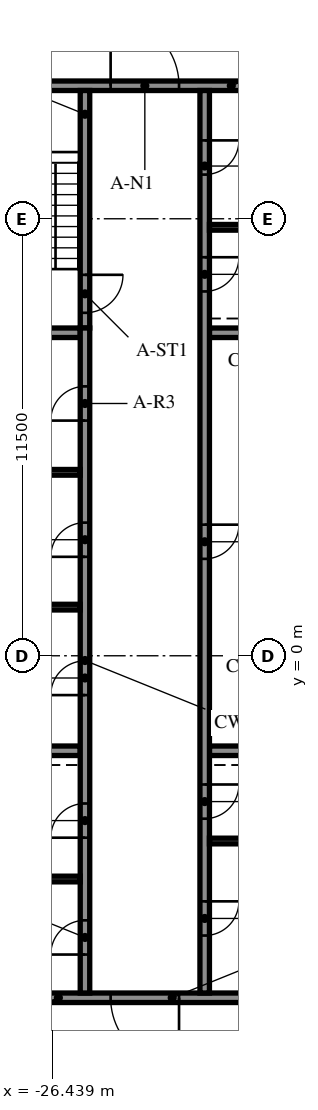
"""IFC4 building model, lengths in metres.
Left out: names, types, materials, properties, quantities, classifications, styles, units other than length and angle.
Written with IfcOpenShell. Run it as: python <this file> out.ifc"""

import sys

from ifc_helpers import new_model, si_unit, direction, frame, frame_2d, origin, place, context, subcontext, project, spatial, rectangle, extrude, element, fill, save


model = new_model("IFC4")
c1 = context("Model", 3, precision=1e-05, world=origin(), true_north=direction((0.0, 1.0)))
c2 = subcontext(c1, "Body", "Model", "MODEL_VIEW")
j1 = project(units=[si_unit("LENGTHUNIT", "METRE"), si_unit("PLANEANGLEUNIT", "RADIAN")], contexts=[c1])
p1 = place(None, origin())
s1 = spatial("IfcSite", under=j1, at=p1, CompositionType="ELEMENT")
p2 = place(p1, origin())
s2 = spatial("IfcBuilding", under=s1, at=p2, CompositionType="ELEMENT")
p3 = place(p2, frame((0.0, 0.0, 193.9)))
s3 = spatial("IfcBuildingStorey", under=s2, at=p3, CompositionType="ELEMENT", Elevation=193.9)
p4 = place(p3, frame((-19.45, -9.0, 0.0), z_axis=(0.0, 0.0, 1.0), x_axis=(-1.0, 0.0, 0.0)))
e1 = element("IfcWall", 1, at=p4, inside=s3, PredefinedType="SOLIDWALL", context=c2, shape_type="SweptSolid", body=[
    extrude(rectangle(XDim=9.1, YDim=0.25, at=frame_2d((4.55, 0.0))), origin(), (0.0, 0.0, 1.0), 3.46),
])
p5 = place(p4, frame((3.65, 0.0, 0.0)))
e2 = element("IfcOpeningElement", 2, at=p5, cuts=e1, PredefinedType="OPENING", context=c2, shape_type="SweptSolid", body=[
    extrude(rectangle(XDim=1.8, YDim=2.1, at=frame_2d((0.9, 1.05))), frame((0.0, 0.135, 0.0), z_axis=(0.0, -1.0, 0.0), x_axis=(1.0, 0.0, 0.0)), (0.0, 0.0, 1.0), 0.27),
])
p6 = place(p3, frame((-28.55, 15.0, 0.0), z_axis=(0.0, 0.0, 1.0), x_axis=(1.0, 0.0, 0.0)))
e3 = element("IfcWall", 3, at=p6, inside=s3, PredefinedType="SOLIDWALL", context=c2, shape_type="SweptSolid", body=[
    extrude(rectangle(XDim=9.1, YDim=0.25, at=frame_2d((4.55, 0.0))), origin(), (0.0, 0.0, 1.0), 3.46),
])
p7 = place(p6, frame((3.65, 0.0, 0.0)))
e4 = element("IfcOpeningElement", 4, at=p7, cuts=e3, PredefinedType="OPENING", context=c2, shape_type="SweptSolid", body=[
    extrude(rectangle(XDim=1.8, YDim=2.1, at=frame_2d((0.9, 1.05))), frame((0.0, 0.135, 0.0), z_axis=(0.0, -1.0, 0.0), x_axis=(1.0, 0.0, 0.0)), (0.0, 0.0, 1.0), 0.27),
])
p8 = place(p3, frame((-25.575, -8.875, 0.0), z_axis=(0.0, 0.0, 1.0), x_axis=(0.0, 1.0, 0.0)))
e5 = element("IfcWall", 5, at=p8, inside=s3, PredefinedType="SOLIDWALL", context=c2, shape_type="SweptSolid", body=[
    extrude(rectangle(XDim=17.5, YDim=0.25, at=frame_2d((8.75, 0.0))), origin(), (0.0, 0.0, 1.0), 3.46),
])
p9 = place(p8, frame((7.84, 0.0, 0.0)))
e6 = element("IfcOpeningElement", 6, at=p9, cuts=e5, PredefinedType="OPENING", context=c2, shape_type="SweptSolid", body=[
    extrude(rectangle(XDim=0.9, YDim=2.1, at=frame_2d((0.45, 1.05))), frame((0.0, 0.135, 0.0), z_axis=(0.0, -1.0, 0.0), x_axis=(1.0, 0.0, 0.0)), (0.0, 0.0, 1.0), 0.27),
])
p10 = place(p8, frame((11.479, 0.0, 0.0)))
e7 = element("IfcOpeningElement", 7, at=p10, cuts=e5, PredefinedType="OPENING", context=c2, shape_type="SweptSolid", body=[
    extrude(rectangle(XDim=0.9, YDim=2.1, at=frame_2d((0.45, 1.05))), frame((0.0, 0.135, 0.0), z_axis=(0.0, -1.0, 0.0), x_axis=(1.0, 0.0, 0.0)), (0.0, 0.0, 1.0), 0.27),
])
p11 = place(p8, frame((15.064, 0.0, 0.0)))
e8 = element("IfcOpeningElement", 8, at=p11, cuts=e5, PredefinedType="OPENING", context=c2, shape_type="SweptSolid", body=[
    extrude(rectangle(XDim=0.9, YDim=2.1, at=frame_2d((0.45, 1.05))), frame((0.0, 0.135, 0.0), z_axis=(0.0, -1.0, 0.0), x_axis=(1.0, 0.0, 0.0)), (0.0, 0.0, 1.0), 0.27),
])
p12 = place(p8, frame((1.012, 0.0, 0.0)))
e9 = element("IfcOpeningElement", 9, at=p12, cuts=e5, PredefinedType="OPENING", context=c2, shape_type="SweptSolid", body=[
    extrude(rectangle(XDim=0.9, YDim=2.1, at=frame_2d((0.45, 1.05))), frame((0.0, 0.135, 0.0), z_axis=(0.0, -1.0, 0.0), x_axis=(1.0, 0.0, 0.0)), (0.0, 0.0, 1.0), 0.27),
])
p13 = place(p8, frame((4.087, 0.0, 0.0)))
e10 = element("IfcOpeningElement", 10, at=p13, cuts=e5, PredefinedType="OPENING", context=c2, shape_type="SweptSolid", body=[
    extrude(rectangle(XDim=0.9, YDim=2.1, at=frame_2d((0.45, 1.05))), frame((0.0, 0.135, 0.0), z_axis=(0.0, -1.0, 0.0), x_axis=(1.0, 0.0, 0.0)), (0.0, 0.0, 1.0), 0.27),
])
p14 = place(p3, frame((-25.575, 14.875, 0.0), z_axis=(0.0, 0.0, 1.0), x_axis=(0.0, -1.0, 0.0)))
e11 = element("IfcWall", 11, at=p14, inside=s3, PredefinedType="SOLIDWALL", context=c2, shape_type="SweptSolid", body=[
    extrude(rectangle(XDim=6.25, YDim=0.25, at=frame_2d((3.125, 0.0))), origin(), (0.0, 0.0, 1.0), 3.46),
])
p15 = place(p14, frame((4.85, 0.0, 0.0)))
e12 = element("IfcOpeningElement", 12, at=p15, cuts=e11, PredefinedType="OPENING", context=c2, shape_type="SweptSolid", body=[
    extrude(rectangle(XDim=1.0, YDim=2.1, at=frame_2d((0.5, 1.05))), frame((0.0, 0.135, 0.0), z_axis=(0.0, -1.0, 0.0), x_axis=(1.0, 0.0, 0.0)), (0.0, 0.0, 1.0), 0.27),
])
p16 = place(p3, frame((-22.425, 14.875, 0.0), z_axis=(0.0, 0.0, 1.0), x_axis=(0.0, -1.0, 0.0)))
e13 = element("IfcWall", 13, at=p16, inside=s3, PredefinedType="SOLIDWALL", context=c2, shape_type="SweptSolid", body=[
    extrude(rectangle(XDim=23.75, YDim=0.25, at=frame_2d((11.875, 0.0))), origin(), (0.0, 0.0, 1.0), 3.46),
])
p17 = place(p16, frame((11.425, 0.0, 0.0)))
e14 = element("IfcOpeningElement", 14, at=p17, cuts=e13, PredefinedType="OPENING", context=c2, shape_type="SweptSolid", body=[
    extrude(rectangle(XDim=0.9, YDim=2.1, at=frame_2d((0.45, 1.05))), frame((0.0, 0.135, 0.0), z_axis=(0.0, -1.0, 0.0), x_axis=(1.0, 0.0, 0.0)), (0.0, 0.0, 1.0), 0.27),
])
p18 = place(p16, frame((21.337, 0.0, 0.0)))
e15 = element("IfcOpeningElement", 15, at=p18, cuts=e13, PredefinedType="OPENING", context=c2, shape_type="SweptSolid", body=[
    extrude(rectangle(XDim=0.9, YDim=2.1, at=frame_2d((0.45, 1.05))), frame((0.0, 0.135, 0.0), z_axis=(0.0, -1.0, 0.0), x_axis=(1.0, 0.0, 0.0)), (0.0, 0.0, 1.0), 0.27),
])
p19 = place(p16, frame((18.262, 0.0, 0.0)))
e16 = element("IfcOpeningElement", 16, at=p19, cuts=e13, PredefinedType="OPENING", context=c2, shape_type="SweptSolid", body=[
    extrude(rectangle(XDim=0.9, YDim=2.1, at=frame_2d((0.45, 1.05))), frame((0.0, 0.135, 0.0), z_axis=(0.0, -1.0, 0.0), x_axis=(1.0, 0.0, 0.0)), (0.0, 0.0, 1.0), 0.27),
])
p20 = place(p16, frame((4.387, 0.0, 0.0)))
e17 = element("IfcOpeningElement", 17, at=p20, cuts=e13, PredefinedType="OPENING", context=c2, shape_type="SweptSolid", body=[
    extrude(rectangle(XDim=0.9, YDim=2.1, at=frame_2d((0.45, 1.05))), frame((0.0, 0.135, 0.0), z_axis=(0.0, -1.0, 0.0), x_axis=(1.0, 0.0, 0.0)), (0.0, 0.0, 1.0), 0.27),
])
p21 = place(p16, frame((1.312, 0.0, 0.0)))
e18 = element("IfcOpeningElement", 18, at=p21, cuts=e13, PredefinedType="OPENING", context=c2, shape_type="SweptSolid", body=[
    extrude(rectangle(XDim=0.9, YDim=2.1, at=frame_2d((0.45, 1.05))), frame((0.0, 0.135, 0.0), z_axis=(0.0, -1.0, 0.0), x_axis=(1.0, 0.0, 0.0)), (0.0, 0.0, 1.0), 0.27),
])
for number, where, z_axis, x_axis in (
    (19, (-28.55, -2.5, 0.0), (0.0, 0.0, 1.0), (1.0, 0.0, 0.0)),
    (20, (-28.55, 8.5, 0.0), (0.0, 0.0, 1.0), (1.0, 0.0, 0.0)),
    (21, (-22.3, -2.5, 0.0), (0.0, 0.0, 1.0), (1.0, 0.0, 0.0)),
    (22, (-22.3, 8.5, 0.0), (0.0, 0.0, 1.0), (1.0, 0.0, 0.0)),
):
    element("IfcWall", number, at=place(p3, frame(where, z_axis=z_axis, x_axis=x_axis)), inside=s3, PredefinedType="SOLIDWALL", context=c2, shape_type="SweptSolid", body=[
        extrude(rectangle(XDim=2.85, YDim=0.25, at=frame_2d((1.425, 0.0))), origin(), (0.0, 0.0, 1.0), 3.46),
    ])
for number, where, z_axis, x_axis in (
    (23, (-28.55, 1.28, 0.0), (0.0, 0.0, 1.0), (1.0, 0.0, 0.0)),
    (24, (-28.55, 4.827, 0.0), (0.0, 0.0, 1.0), (1.0, 0.0, 0.0)),
    (25, (-28.55, -5.875, 0.0), (0.0, 0.0, 1.0), (1.0, 0.0, 0.0)),
    (26, (-22.3, -4.875, 0.0), (0.0, 0.0, 1.0), (1.0, 0.0, 0.0)),
    (27, (-22.3, 11.275, 0.0), (0.0, 0.0, 1.0), (1.0, 0.0, 0.0)),
):
    element("IfcWall", number, at=place(p3, frame(where, z_axis=z_axis, x_axis=x_axis)), inside=s3, PredefinedType="PARTITIONING", context=c2, shape_type="SweptSolid", body=[
        extrude(rectangle(XDim=2.85, YDim=0.15, at=frame_2d((1.425, 0.0))), origin(), (0.0, 0.0, 1.0), 3.46),
    ])
p22 = place(p5, origin())
e28 = element("IfcDoor", 28, at=p22, inside=s3, OperationType="DOUBLE_DOOR_SINGLE_SWING", PredefinedType="DOOR", context=c2, shape_type="SweptSolid", body=[
    extrude(rectangle(XDim=1.8, YDim=2.1, at=frame_2d((0.9, 1.05))), frame((0.0, 0.025, 0.0), z_axis=(0.0, -1.0, 0.0), x_axis=(1.0, 0.0, 0.0)), (0.0, 0.0, 1.0), 0.05),
])
fill(e2, e28)
p23 = place(p7, origin())
e29 = element("IfcDoor", 29, at=p23, inside=s3, OperationType="DOUBLE_DOOR_SINGLE_SWING", PredefinedType="DOOR", context=c2, shape_type="SweptSolid", body=[
    extrude(rectangle(XDim=1.8, YDim=2.1, at=frame_2d((0.9, 1.05))), frame((0.0, 0.025, 0.0), z_axis=(0.0, -1.0, 0.0), x_axis=(1.0, 0.0, 0.0)), (0.0, 0.0, 1.0), 0.05),
])
fill(e4, e29)
p24 = place(p9, origin())
e30 = element("IfcDoor", 30, at=p24, inside=s3, OperationType="SINGLE_SWING_LEFT", PredefinedType="DOOR", context=c2, shape_type="SweptSolid", body=[
    extrude(rectangle(XDim=0.9, YDim=2.1, at=frame_2d((0.45, 1.05))), frame((0.0, 0.025, 0.0), z_axis=(0.0, -1.0, 0.0), x_axis=(1.0, 0.0, 0.0)), (0.0, 0.0, 1.0), 0.05),
])
fill(e6, e30)
p25 = place(p10, origin())
e31 = element("IfcDoor", 31, at=p25, inside=s3, OperationType="SINGLE_SWING_RIGHT", PredefinedType="DOOR", context=c2, shape_type="SweptSolid", body=[
    extrude(rectangle(XDim=0.9, YDim=2.1, at=frame_2d((0.45, 1.05))), frame((0.0, 0.025, 0.0), z_axis=(0.0, -1.0, 0.0), x_axis=(1.0, 0.0, 0.0)), (0.0, 0.0, 1.0), 0.05),
])
fill(e7, e31)
p26 = place(p11, origin())
e32 = element("IfcDoor", 32, at=p26, inside=s3, OperationType="SINGLE_SWING_LEFT", PredefinedType="DOOR", context=c2, shape_type="SweptSolid", body=[
    extrude(rectangle(XDim=0.9, YDim=2.1, at=frame_2d((0.45, 1.05))), frame((0.0, 0.025, 0.0), z_axis=(0.0, -1.0, 0.0), x_axis=(1.0, 0.0, 0.0)), (0.0, 0.0, 1.0), 0.05),
])
fill(e8, e32)
p27 = place(p17, origin())
e33 = element("IfcDoor", 33, at=p27, inside=s3, OperationType="SINGLE_SWING_RIGHT", PredefinedType="DOOR", context=c2, shape_type="SweptSolid", body=[
    extrude(rectangle(XDim=0.9, YDim=2.1, at=frame_2d((0.45, 1.05))), frame((0.0, 0.025, 0.0), z_axis=(0.0, -1.0, 0.0), x_axis=(1.0, 0.0, 0.0)), (0.0, 0.0, 1.0), 0.05),
])
fill(e14, e33)
p28 = place(p12, origin())
e34 = element("IfcDoor", 34, at=p28, inside=s3, OperationType="SINGLE_SWING_LEFT", PredefinedType="DOOR", context=c2, shape_type="SweptSolid", body=[
    extrude(rectangle(XDim=0.9, YDim=2.1, at=frame_2d((0.45, 1.05))), frame((0.0, 0.025, 0.0), z_axis=(0.0, -1.0, 0.0), x_axis=(1.0, 0.0, 0.0)), (0.0, 0.0, 1.0), 0.05),
])
fill(e9, e34)
p29 = place(p13, origin())
e35 = element("IfcDoor", 35, at=p29, inside=s3, OperationType="SINGLE_SWING_RIGHT", PredefinedType="DOOR", context=c2, shape_type="SweptSolid", body=[
    extrude(rectangle(XDim=0.9, YDim=2.1, at=frame_2d((0.45, 1.05))), frame((0.0, 0.025, 0.0), z_axis=(0.0, -1.0, 0.0), x_axis=(1.0, 0.0, 0.0)), (0.0, 0.0, 1.0), 0.05),
])
fill(e10, e35)
p30 = place(p18, origin())
e36 = element("IfcDoor", 36, at=p30, inside=s3, OperationType="SINGLE_SWING_LEFT", PredefinedType="DOOR", context=c2, shape_type="SweptSolid", body=[
    extrude(rectangle(XDim=0.9, YDim=2.1, at=frame_2d((0.45, 1.05))), frame((0.0, 0.025, 0.0), z_axis=(0.0, -1.0, 0.0), x_axis=(1.0, 0.0, 0.0)), (0.0, 0.0, 1.0), 0.05),
])
fill(e15, e36)
p31 = place(p19, origin())
e37 = element("IfcDoor", 37, at=p31, inside=s3, OperationType="SINGLE_SWING_RIGHT", PredefinedType="DOOR", context=c2, shape_type="SweptSolid", body=[
    extrude(rectangle(XDim=0.9, YDim=2.1, at=frame_2d((0.45, 1.05))), frame((0.0, 0.025, 0.0), z_axis=(0.0, -1.0, 0.0), x_axis=(1.0, 0.0, 0.0)), (0.0, 0.0, 1.0), 0.05),
])
fill(e16, e37)
p32 = place(p20, origin())
e38 = element("IfcDoor", 38, at=p32, inside=s3, OperationType="SINGLE_SWING_LEFT", PredefinedType="DOOR", context=c2, shape_type="SweptSolid", body=[
    extrude(rectangle(XDim=0.9, YDim=2.1, at=frame_2d((0.45, 1.05))), frame((0.0, 0.025, 0.0), z_axis=(0.0, -1.0, 0.0), x_axis=(1.0, 0.0, 0.0)), (0.0, 0.0, 1.0), 0.05),
])
fill(e17, e38)
p33 = place(p21, origin())
e39 = element("IfcDoor", 39, at=p33, inside=s3, OperationType="SINGLE_SWING_RIGHT", PredefinedType="DOOR", context=c2, shape_type="SweptSolid", body=[
    extrude(rectangle(XDim=0.9, YDim=2.1, at=frame_2d((0.45, 1.05))), frame((0.0, 0.025, 0.0), z_axis=(0.0, -1.0, 0.0), x_axis=(1.0, 0.0, 0.0)), (0.0, 0.0, 1.0), 0.05),
])
fill(e18, e39)
p34 = place(p15, origin())
e40 = element("IfcDoor", 40, at=p34, inside=s3, OperationType="SINGLE_SWING_LEFT", PredefinedType="DOOR", context=c2, shape_type="SweptSolid", body=[
    extrude(rectangle(XDim=1.0, YDim=2.1, at=frame_2d((0.5, 1.05))), frame((0.0, 0.025, 0.0), z_axis=(0.0, -1.0, 0.0), x_axis=(1.0, 0.0, 0.0)), (0.0, 0.0, 1.0), 0.05),
])
fill(e12, e40)
save(model, sys.argv[1])
